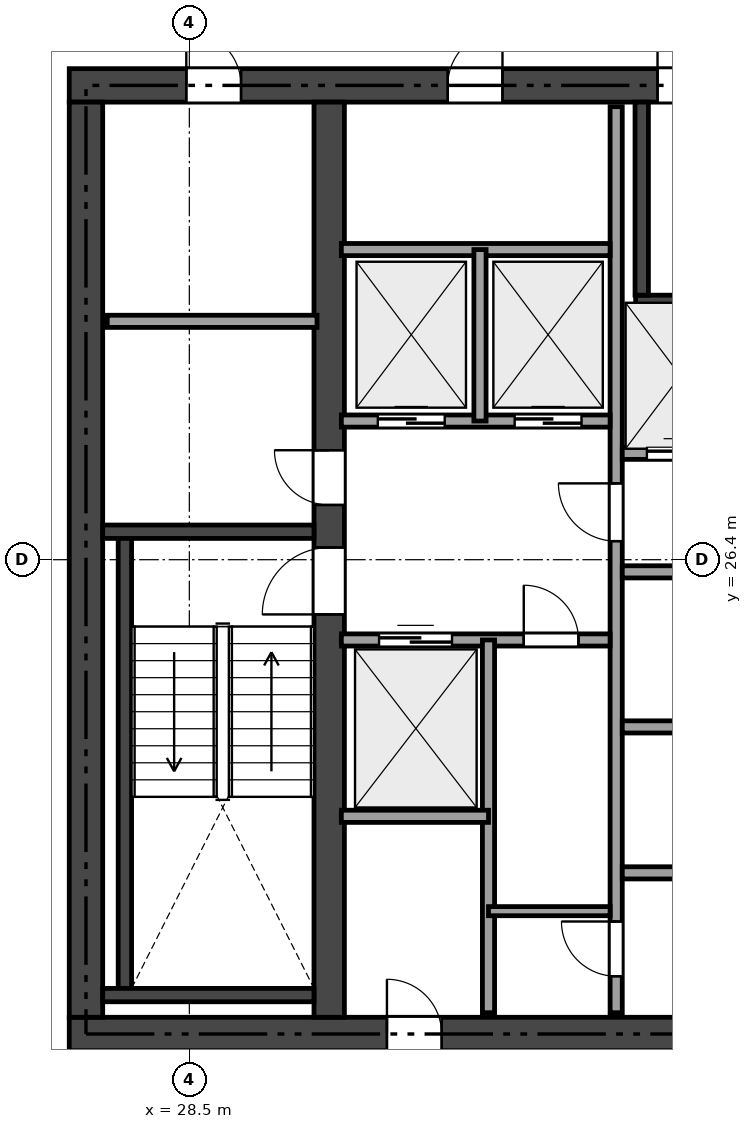
"""IFC4 building model, lengths in metres.
Left out: names, types, materials, properties, quantities, classifications, styles, units other than length and angle.
Written with IfcOpenShell. Run it as: python <this file> out.ifc"""

import sys

from ifc_helpers import new_model, si_unit, direction, frame, frame_2d, origin, place, context, subcontext, project, spatial, rectangle, extrude, element, fill, save


model = new_model("IFC4")
c1 = context("Model", 3, precision=1e-05, world=origin(), true_north=direction((0.0, 1.0)))
c2 = subcontext(c1, "Body", "Model", "MODEL_VIEW")
j1 = project(units=[si_unit("LENGTHUNIT", "METRE"), si_unit("PLANEANGLEUNIT", "RADIAN")], contexts=[c1])
p1 = place(None, origin())
s1 = spatial("IfcSite", under=j1, at=p1, CompositionType="ELEMENT")
p2 = place(p1, origin())
s2 = spatial("IfcBuilding", under=s1, at=p2, CompositionType="ELEMENT")
p3 = place(p2, frame((0.0, 0.0, 231.9)))
s3 = spatial("IfcBuildingStorey", under=s2, at=p3, CompositionType="ELEMENT", Elevation=231.9)
p4 = place(p3, frame((26.525, 18.6, 0.0), z_axis=(0.0, 0.0, 1.0), x_axis=(1.0, 0.0, 0.0)))
e1 = element("IfcWall", 1, at=p4, inside=s3, PredefinedType="SHEAR", context=c2, shape_type="SweptSolid", body=[
    extrude(rectangle(XDim=21.35, YDim=0.55, at=frame_2d((10.675, 0.0))), origin(), (0.0, 0.0, 1.0), 3.18),
])
p5 = place(p4, frame((12.4, 0.0, 0.0)))
e2 = element("IfcOpeningElement", 2, at=p5, cuts=e1, PredefinedType="OPENING", context=c2, shape_type="SweptSolid", body=[
    extrude(rectangle(XDim=1.15, YDim=2.15, at=frame_2d((0.575, 1.075))), frame((0.0, 0.285, 0.0), z_axis=(0.0, -1.0, 0.0), x_axis=(1.0, 0.0, 0.0)), (0.0, 0.0, 1.0), 0.57),
])
p6 = place(p4, frame((5.225, 0.0, 0.0)))
e3 = element("IfcOpeningElement", 3, at=p6, cuts=e1, PredefinedType="OPENING", context=c2, shape_type="SweptSolid", body=[
    extrude(rectangle(XDim=0.9, YDim=2.1, at=frame_2d((0.45, 1.05))), frame((0.0, 0.285, 0.0), z_axis=(0.0, -1.0, 0.0), x_axis=(1.0, 0.0, 0.0)), (0.0, 0.0, 1.0), 0.57),
])
p7 = place(p3, frame((26.525, 34.2, 0.0), z_axis=(0.0, 0.0, 1.0), x_axis=(1.0, 0.0, 0.0)))
e4 = element("IfcWall", 4, at=p7, inside=s3, PredefinedType="SHEAR", context=c2, shape_type="SweptSolid", body=[
    extrude(rectangle(XDim=21.35, YDim=0.55, at=frame_2d((10.675, 0.0))), origin(), (0.0, 0.0, 1.0), 3.18),
])
p8 = place(p7, frame((9.675, 0.0, 0.0)))
e5 = element("IfcOpeningElement", 5, at=p8, cuts=e4, PredefinedType="OPENING", context=c2, shape_type="SweptSolid", body=[
    extrude(rectangle(XDim=1.1, YDim=2.15, at=frame_2d((0.55, 1.075))), frame((0.0, 0.285, 0.0), z_axis=(0.0, -1.0, 0.0), x_axis=(1.0, 0.0, 0.0)), (0.0, 0.0, 1.0), 0.57),
])
p9 = place(p7, frame((1.925, 0.0, 0.0)))
e6 = element("IfcOpeningElement", 6, at=p9, cuts=e4, PredefinedType="OPENING", context=c2, shape_type="SweptSolid", body=[
    extrude(rectangle(XDim=0.9, YDim=2.1, at=frame_2d((0.45, 1.05))), frame((0.0, 0.285, 0.0), z_axis=(0.0, -1.0, 0.0), x_axis=(1.0, 0.0, 0.0)), (0.0, 0.0, 1.0), 0.57),
])
p10 = place(p7, frame((6.225, 0.0, 0.0)))
e7 = element("IfcOpeningElement", 7, at=p10, cuts=e4, PredefinedType="OPENING", context=c2, shape_type="SweptSolid", body=[
    extrude(rectangle(XDim=0.9, YDim=2.1, at=frame_2d((0.45, 1.05))), frame((0.0, 0.285, 0.0), z_axis=(0.0, -1.0, 0.0), x_axis=(1.0, 0.0, 0.0)), (0.0, 0.0, 1.0), 0.57),
])
p11 = place(p3, frame((26.8, 18.875, 0.0), z_axis=(0.0, 0.0, 1.0), x_axis=(0.0, 1.0, 0.0)))
e8 = element("IfcWall", 8, at=p11, inside=s3, PredefinedType="SHEAR", context=c2, shape_type="SweptSolid", body=[
    extrude(rectangle(XDim=15.05, YDim=0.55, at=frame_2d((7.525, 0.0))), origin(), (0.0, 0.0, 1.0), 3.18),
])
p12 = place(p3, frame((30.8, 18.875, 0.0), z_axis=(0.0, 0.0, 1.0), x_axis=(0.0, 1.0, 0.0)))
e9 = element("IfcWall", 9, at=p12, inside=s3, PredefinedType="SHEAR", context=c2, shape_type="SweptSolid", body=[
    extrude(rectangle(XDim=15.05, YDim=0.5, at=frame_2d((7.525, 0.0))), origin(), (0.0, 0.0, 1.0), 3.18),
])
p13 = place(p12, frame((6.625, 0.0, 0.0)))
e10 = element("IfcOpeningElement", 10, at=p13, cuts=e9, PredefinedType="OPENING", context=c2, shape_type="SweptSolid", body=[
    extrude(rectangle(XDim=1.1, YDim=2.15, at=frame_2d((0.55, 1.075))), frame((0.0, 0.26, 0.0), z_axis=(0.0, -1.0, 0.0), x_axis=(1.0, 0.0, 0.0)), (0.0, 0.0, 1.0), 0.52),
])
p14 = place(p12, frame((8.425, 0.0, 0.0)))
e11 = element("IfcOpeningElement", 11, at=p14, cuts=e9, PredefinedType="OPENING", context=c2, shape_type="SweptSolid", body=[
    extrude(rectangle(XDim=0.9, YDim=2.1, at=frame_2d((0.45, 1.05))), frame((0.0, 0.26, 0.0), z_axis=(0.0, -1.0, 0.0), x_axis=(1.0, 0.0, 0.0)), (0.0, 0.0, 1.0), 0.52),
])
p15 = place(p3, frame((27.075, 26.86, 0.0), z_axis=(0.0, 0.0, 1.0), x_axis=(1.0, 0.0, 0.0)))
e12 = element("IfcWall", 12, at=p15, inside=s3, PredefinedType="SHEAR", context=c2, shape_type="SweptSolid", body=[
    extrude(rectangle(XDim=3.475, YDim=0.22, at=frame_2d((1.738, 0.0))), origin(), (0.0, 0.0, 1.0), 3.18),
])
p16 = place(p3, frame((27.44, 19.35, 0.0), z_axis=(0.0, 0.0, 1.0), x_axis=(0.0, 1.0, 0.0)))
e13 = element("IfcWall", 13, at=p16, inside=s3, PredefinedType="SHEAR", context=c2, shape_type="SweptSolid", body=[
    extrude(rectangle(XDim=7.4, YDim=0.22, at=frame_2d((3.7, 0.0))), origin(), (0.0, 0.0, 1.0), 3.18),
])
p17 = place(p3, frame((27.075, 19.24, 0.0), z_axis=(0.0, 0.0, 1.0), x_axis=(1.0, 0.0, 0.0)))
e14 = element("IfcWall", 14, at=p17, inside=s3, PredefinedType="SHEAR", context=c2, shape_type="SweptSolid", body=[
    extrude(rectangle(XDim=3.475, YDim=0.22, at=frame_2d((1.738, 0.0))), origin(), (0.0, 0.0, 1.0), 3.18),
])
p18 = place(p3, frame((35.84, 30.64, 0.0), z_axis=(0.0, 0.0, 1.0), x_axis=(1.0, 0.0, 0.0)))
e15 = element("IfcWall", 15, at=p18, inside=s3, PredefinedType="SHEAR", context=c2, shape_type="SweptSolid", body=[
    extrude(rectangle(XDim=7.61, YDim=0.22, at=frame_2d((3.805, 0.0))), origin(), (0.0, 0.0, 1.0), 3.18),
])
p19 = place(p3, frame((35.94, 30.75, 0.0), z_axis=(0.0, 0.0, 1.0), x_axis=(0.0, 1.0, 0.0)))
e16 = element("IfcWall", 16, at=p19, inside=s3, PredefinedType="SHEAR", context=c2, shape_type="SweptSolid", body=[
    extrude(rectangle(XDim=3.175, YDim=0.22, at=frame_2d((1.587, 0.0))), origin(), (0.0, 0.0, 1.0), 3.18),
])
p20 = place(p3, frame((27.15, 30.32, 0.0), z_axis=(0.0, 0.0, 1.0), x_axis=(1.0, 0.0, 0.0)))
e17 = element("IfcWall", 17, at=p20, inside=s3, PredefinedType="SOLIDWALL", context=c2, shape_type="SweptSolid", body=[
    extrude(rectangle(XDim=3.45, YDim=0.2, at=frame_2d((1.725, 0.0))), origin(), (0.0, 0.0, 1.0), 3.18),
])
p21 = place(p3, frame((35.52, 18.95, 0.0), z_axis=(0.0, 0.0, 1.0), x_axis=(0.0, 1.0, 0.0)))
e18 = element("IfcWall", 18, at=p21, inside=s3, PredefinedType="SOLIDWALL", context=c2, shape_type="SweptSolid", body=[
    extrude(rectangle(XDim=14.9, YDim=0.2, at=frame_2d((7.45, 0.0))), origin(), (0.0, 0.0, 1.0), 2.701),
])
p22 = place(p21, frame((7.755, 0.0, 0.0)))
e19 = element("IfcOpeningElement", 19, at=p22, cuts=e18, PredefinedType="OPENING", context=c2, shape_type="SweptSolid", body=[
    extrude(rectangle(XDim=0.95, YDim=2.15, at=frame_2d((0.475, 1.075))), frame((0.0, 0.11, 0.0), z_axis=(0.0, -1.0, 0.0), x_axis=(1.0, 0.0, 0.0)), (0.0, 0.0, 1.0), 0.22),
])
p23 = place(p21, frame((0.6, 0.0, 0.0)))
e20 = element("IfcOpeningElement", 20, at=p23, cuts=e18, PredefinedType="OPENING", context=c2, shape_type="SweptSolid", body=[
    extrude(rectangle(XDim=0.9, YDim=2.1, at=frame_2d((0.45, 1.05))), frame((0.0, 0.11, 0.0), z_axis=(0.0, -1.0, 0.0), x_axis=(1.0, 0.0, 0.0)), (0.0, 0.0, 1.0), 0.22),
])
p24 = place(p3, frame((31.0, 28.68, 0.0), z_axis=(0.0, 0.0, 1.0), x_axis=(1.0, 0.0, 0.0)))
e21 = element("IfcWall", 21, at=p24, inside=s3, PredefinedType="SOLIDWALL", context=c2, shape_type="SweptSolid", body=[
    extrude(rectangle(XDim=4.42, YDim=0.2, at=frame_2d((2.21, 0.0))), origin(), (0.0, 0.0, 1.0), 3.18),
])
p25 = place(p24, frame((0.6, 0.0, 0.0)))
e22 = element("IfcOpeningElement", 22, at=p25, cuts=e21, PredefinedType="OPENING", context=c2, shape_type="SweptSolid", body=[
    extrude(rectangle(XDim=1.1, YDim=2.15, at=frame_2d((0.55, 1.075))), frame((0.0, 0.11, 0.0), z_axis=(0.0, -1.0, 0.0), x_axis=(1.0, 0.0, 0.0)), (0.0, 0.0, 1.0), 0.22),
])
p26 = place(p24, frame((2.85, 0.0, 0.0)))
e23 = element("IfcOpeningElement", 23, at=p26, cuts=e21, PredefinedType="OPENING", context=c2, shape_type="SweptSolid", body=[
    extrude(rectangle(XDim=1.1, YDim=2.15, at=frame_2d((0.55, 1.075))), frame((0.0, 0.11, 0.0), z_axis=(0.0, -1.0, 0.0), x_axis=(1.0, 0.0, 0.0)), (0.0, 0.0, 1.0), 0.22),
])
p27 = place(p3, frame((31.0, 31.5, 0.0), z_axis=(0.0, 0.0, 1.0), x_axis=(1.0, 0.0, 0.0)))
e24 = element("IfcWall", 24, at=p27, inside=s3, PredefinedType="SOLIDWALL", context=c2, shape_type="SweptSolid", body=[
    extrude(rectangle(XDim=4.42, YDim=0.2, at=frame_2d((2.21, 0.0))), origin(), (0.0, 0.0, 1.0), 3.18),
])
p28 = place(p3, frame((33.28, 28.68, 0.0), z_axis=(0.0, 0.0, 1.0), x_axis=(0.0, 1.0, 0.0)))
e25 = element("IfcWall", 25, at=p28, inside=s3, PredefinedType="SOLIDWALL", context=c2, shape_type="SweptSolid", body=[
    extrude(rectangle(XDim=2.82, YDim=0.2, at=frame_2d((1.41, 0.0))), origin(), (0.0, 0.0, 1.0), 3.18),
])
p29 = place(p3, frame((31.0, 25.08, 0.0), z_axis=(0.0, 0.0, 1.0), x_axis=(1.0, 0.0, 0.0)))
e26 = element("IfcWall", 26, at=p29, inside=s3, PredefinedType="SOLIDWALL", context=c2, shape_type="SweptSolid", body=[
    extrude(rectangle(XDim=4.42, YDim=0.2, at=frame_2d((2.21, 0.0))), origin(), (0.0, 0.0, 1.0), 3.18),
])
p30 = place(p29, frame((3.0, 0.0, 0.0)))
e27 = element("IfcOpeningElement", 27, at=p30, cuts=e26, PredefinedType="OPENING", context=c2, shape_type="SweptSolid", body=[
    extrude(rectangle(XDim=0.9, YDim=2.1, at=frame_2d((0.45, 1.05))), frame((0.0, 0.11, 0.0), z_axis=(0.0, -1.0, 0.0), x_axis=(1.0, 0.0, 0.0)), (0.0, 0.0, 1.0), 0.22),
])
p31 = place(p29, frame((0.62, 0.0, 0.0)))
e28 = element("IfcOpeningElement", 28, at=p31, cuts=e26, PredefinedType="OPENING", context=c2, shape_type="SweptSolid", body=[
    extrude(rectangle(XDim=1.2, YDim=2.15, at=frame_2d((0.6, 1.075))), frame((0.0, 0.11, 0.0), z_axis=(0.0, -1.0, 0.0), x_axis=(1.0, 0.0, 0.0)), (0.0, 0.0, 1.0), 0.22),
])
p32 = place(p3, frame((33.42, 18.95, 0.0), z_axis=(0.0, 0.0, 1.0), x_axis=(0.0, 1.0, 0.0)))
e29 = element("IfcWall", 29, at=p32, inside=s3, PredefinedType="SOLIDWALL", context=c2, shape_type="SweptSolid", body=[
    extrude(rectangle(XDim=6.13, YDim=0.2, at=frame_2d((3.065, 0.0))), origin(), (0.0, 0.0, 1.0), 2.701),
])
p33 = place(p3, frame((31.0, 22.18, 0.0), z_axis=(0.0, 0.0, 1.0), x_axis=(1.0, 0.0, 0.0)))
e30 = element("IfcWall", 30, at=p33, inside=s3, PredefinedType="SOLIDWALL", context=c2, shape_type="SweptSolid", body=[
    extrude(rectangle(XDim=2.42, YDim=0.2, at=frame_2d((1.21, 0.0))), origin(), (0.0, 0.0, 1.0), 3.18),
])
p34 = place(p3, frame((33.42, 20.62, 0.0), z_axis=(0.0, 0.0, 1.0), x_axis=(1.0, 0.0, 0.0)))
e31 = element("IfcWall", 31, at=p34, inside=s3, PredefinedType="PARTITIONING", context=c2, shape_type="SweptSolid", body=[
    extrude(rectangle(XDim=2.0, YDim=0.15, at=frame_2d((1.0, 0.0))), origin(), (0.0, 0.0, 1.0), 3.18),
])
p35 = place(p3, frame((35.62, 28.15, 0.0), z_axis=(0.0, 0.0, 1.0), x_axis=(1.0, 0.0, 0.0)))
e32 = element("IfcWall", 32, at=p35, inside=s3, PredefinedType="SOLIDWALL", context=c2, shape_type="SweptSolid", body=[
    extrude(rectangle(XDim=7.88, YDim=0.2, at=frame_2d((3.94, 0.0))), origin(), (0.0, 0.0, 1.0), 3.18),
])
p36 = place(p35, frame((0.405, 0.0, 0.0)))
e33 = element("IfcOpeningElement", 33, at=p36, cuts=e32, PredefinedType="OPENING", context=c2, shape_type="SweptSolid", body=[
    extrude(rectangle(XDim=1.1, YDim=2.15, at=frame_2d((0.55, 1.075))), frame((0.0, 0.11, 0.0), z_axis=(0.0, -1.0, 0.0), x_axis=(1.0, 0.0, 0.0)), (0.0, 0.0, 1.0), 0.22),
])
p37 = place(p35, frame((2.355, 0.0, 0.0)))
e34 = element("IfcOpeningElement", 34, at=p37, cuts=e32, PredefinedType="OPENING", context=c2, shape_type="SweptSolid", body=[
    extrude(rectangle(XDim=1.1, YDim=2.15, at=frame_2d((0.55, 1.075))), frame((0.0, 0.11, 0.0), z_axis=(0.0, -1.0, 0.0), x_axis=(1.0, 0.0, 0.0)), (0.0, 0.0, 1.0), 0.22),
])
p38 = place(p35, frame((4.305, 0.0, 0.0)))
e35 = element("IfcOpeningElement", 35, at=p38, cuts=e32, PredefinedType="OPENING", context=c2, shape_type="SweptSolid", body=[
    extrude(rectangle(XDim=1.1, YDim=2.15, at=frame_2d((0.55, 1.075))), frame((0.0, 0.11, 0.0), z_axis=(0.0, -1.0, 0.0), x_axis=(1.0, 0.0, 0.0)), (0.0, 0.0, 1.0), 0.22),
])
p39 = place(p35, frame((6.255, 0.0, 0.0)))
e36 = element("IfcOpeningElement", 36, at=p39, cuts=e32, PredefinedType="OPENING", context=c2, shape_type="SweptSolid", body=[
    extrude(rectangle(XDim=1.1, YDim=2.15, at=frame_2d((0.55, 1.075))), frame((0.0, 0.11, 0.0), z_axis=(0.0, -1.0, 0.0), x_axis=(1.0, 0.0, 0.0)), (0.0, 0.0, 1.0), 0.22),
])
p40 = place(p3, frame((35.62, 26.2, 0.0), z_axis=(0.0, 0.0, 1.0), x_axis=(1.0, 0.0, 0.0)))
e37 = element("IfcWall", 37, at=p40, inside=s3, PredefinedType="SOLIDWALL", context=c2, shape_type="SweptSolid", body=[
    extrude(rectangle(XDim=7.88, YDim=0.2, at=frame_2d((3.94, 0.0))), origin(), (0.0, 0.0, 1.0), 3.18),
])
p41 = place(p40, frame((1.13, 0.0, 0.0)))
e38 = element("IfcOpeningElement", 38, at=p41, cuts=e37, PredefinedType="OPENING", context=c2, shape_type="SweptSolid", body=[
    extrude(rectangle(XDim=0.9, YDim=2.1, at=frame_2d((0.45, 1.05))), frame((0.0, 0.11, 0.0), z_axis=(0.0, -1.0, 0.0), x_axis=(1.0, 0.0, 0.0)), (0.0, 0.0, 1.0), 0.22),
])
p42 = place(p40, frame((5.73, 0.0, 0.0)))
e39 = element("IfcOpeningElement", 39, at=p42, cuts=e37, PredefinedType="OPENING", context=c2, shape_type="SweptSolid", body=[
    extrude(rectangle(XDim=0.9, YDim=2.1, at=frame_2d((0.45, 1.05))), frame((0.0, 0.11, 0.0), z_axis=(0.0, -1.0, 0.0), x_axis=(1.0, 0.0, 0.0)), (0.0, 0.0, 1.0), 0.22),
])
p43 = place(p3, frame((35.62, 23.65, 0.0), z_axis=(0.0, 0.0, 1.0), x_axis=(1.0, 0.0, 0.0)))
e40 = element("IfcWall", 40, at=p43, inside=s3, PredefinedType="SOLIDWALL", context=c2, shape_type="SweptSolid", body=[
    extrude(rectangle(XDim=7.88, YDim=0.2, at=frame_2d((3.94, 0.0))), origin(), (0.0, 0.0, 1.0), 2.701),
])
p44 = place(p3, frame((35.62, 21.25, 0.0), z_axis=(0.0, 0.0, 1.0), x_axis=(1.0, 0.0, 0.0)))
e41 = element("IfcWall", 41, at=p44, inside=s3, PredefinedType="SOLIDWALL", context=c2, shape_type="SweptSolid", body=[
    extrude(rectangle(XDim=7.88, YDim=0.2, at=frame_2d((3.94, 0.0))), origin(), (0.0, 0.0, 1.0), 3.18),
])
p45 = place(p44, frame((1.13, 0.0, 0.0)))
e42 = element("IfcOpeningElement", 42, at=p45, cuts=e41, PredefinedType="OPENING", context=c2, shape_type="SweptSolid", body=[
    extrude(rectangle(XDim=0.9, YDim=2.1, at=frame_2d((0.45, 1.05))), frame((0.0, 0.11, 0.0), z_axis=(0.0, -1.0, 0.0), x_axis=(1.0, 0.0, 0.0)), (0.0, 0.0, 1.0), 0.22),
])
p46 = place(p44, frame((5.73, 0.0, 0.0)))
e43 = element("IfcOpeningElement", 43, at=p46, cuts=e41, PredefinedType="OPENING", context=c2, shape_type="SweptSolid", body=[
    extrude(rectangle(XDim=0.9, YDim=2.1, at=frame_2d((0.45, 1.05))), frame((0.0, 0.11, 0.0), z_axis=(0.0, -1.0, 0.0), x_axis=(1.0, 0.0, 0.0)), (0.0, 0.0, 1.0), 0.22),
])
p47 = place(p13, origin())
e44 = element("IfcDoor", 44, at=p47, inside=s3, OperationType="SINGLE_SWING_LEFT", PredefinedType="DOOR", context=c2, shape_type="SweptSolid", body=[
    extrude(rectangle(XDim=1.1, YDim=2.15, at=frame_2d((0.55, 1.075))), frame((0.0, 0.025, 0.0), z_axis=(0.0, -1.0, 0.0), x_axis=(1.0, 0.0, 0.0)), (0.0, 0.0, 1.0), 0.05),
])
fill(e10, e44)
p48 = place(p8, origin())
e45 = element("IfcDoor", 45, at=p48, inside=s3, OperationType="SINGLE_SWING_LEFT", PredefinedType="DOOR", context=c2, shape_type="SweptSolid", body=[
    extrude(rectangle(XDim=1.1, YDim=2.15, at=frame_2d((0.55, 1.075))), frame((0.0, 0.025, 0.0), z_axis=(0.0, -1.0, 0.0), x_axis=(1.0, 0.0, 0.0)), (0.0, 0.0, 1.0), 0.05),
])
fill(e5, e45)
p49 = place(p22, origin())
e46 = element("IfcDoor", 46, at=p49, inside=s3, OperationType="SINGLE_SWING_RIGHT", PredefinedType="DOOR", context=c2, shape_type="SweptSolid", body=[
    extrude(rectangle(XDim=0.95, YDim=2.15, at=frame_2d((0.475, 1.075))), frame((0.0, 0.025, 0.0), z_axis=(0.0, -1.0, 0.0), x_axis=(1.0, 0.0, 0.0)), (0.0, 0.0, 1.0), 0.05),
])
fill(e19, e46)
p50 = place(p14, origin())
e47 = element("IfcDoor", 47, at=p50, inside=s3, OperationType="SINGLE_SWING_RIGHT", PredefinedType="DOOR", context=c2, shape_type="SweptSolid", body=[
    extrude(rectangle(XDim=0.9, YDim=2.1, at=frame_2d((0.45, 1.05))), frame((0.0, 0.025, 0.0), z_axis=(0.0, -1.0, 0.0), x_axis=(1.0, 0.0, 0.0)), (0.0, 0.0, 1.0), 0.05),
])
fill(e11, e47)
p51 = place(p9, origin())
e48 = element("IfcDoor", 48, at=p51, inside=s3, OperationType="SINGLE_SWING_LEFT", PredefinedType="DOOR", context=c2, shape_type="SweptSolid", body=[
    extrude(rectangle(XDim=0.9, YDim=2.1, at=frame_2d((0.45, 1.05))), frame((0.0, 0.025, 0.0), z_axis=(0.0, -1.0, 0.0), x_axis=(1.0, 0.0, 0.0)), (0.0, 0.0, 1.0), 0.05),
])
fill(e6, e48)
p52 = place(p10, origin())
e49 = element("IfcDoor", 49, at=p52, inside=s3, OperationType="SINGLE_SWING_RIGHT", PredefinedType="DOOR", context=c2, shape_type="SweptSolid", body=[
    extrude(rectangle(XDim=0.9, YDim=2.1, at=frame_2d((0.45, 1.05))), frame((0.0, 0.025, 0.0), z_axis=(0.0, -1.0, 0.0), x_axis=(1.0, 0.0, 0.0)), (0.0, 0.0, 1.0), 0.05),
])
fill(e7, e49)
p53 = place(p6, origin())
e50 = element("IfcDoor", 50, at=p53, inside=s3, OperationType="SINGLE_SWING_LEFT", PredefinedType="DOOR", context=c2, shape_type="SweptSolid", body=[
    extrude(rectangle(XDim=0.9, YDim=2.1, at=frame_2d((0.45, 1.05))), frame((0.0, 0.025, 0.0), z_axis=(0.0, -1.0, 0.0), x_axis=(1.0, 0.0, 0.0)), (0.0, 0.0, 1.0), 0.05),
])
fill(e3, e50)
p54 = place(p23, origin())
e51 = element("IfcDoor", 51, at=p54, inside=s3, OperationType="SINGLE_SWING_RIGHT", PredefinedType="DOOR", context=c2, shape_type="SweptSolid", body=[
    extrude(rectangle(XDim=0.9, YDim=2.1, at=frame_2d((0.45, 1.05))), frame((0.0, 0.025, 0.0), z_axis=(0.0, -1.0, 0.0), x_axis=(1.0, 0.0, 0.0)), (0.0, 0.0, 1.0), 0.05),
])
fill(e20, e51)
p55 = place(p30, origin())
e52 = element("IfcDoor", 52, at=p55, inside=s3, OperationType="SINGLE_SWING_LEFT", PredefinedType="DOOR", context=c2, shape_type="SweptSolid", body=[
    extrude(rectangle(XDim=0.9, YDim=2.1, at=frame_2d((0.45, 1.05))), frame((0.0, 0.025, 0.0), z_axis=(0.0, -1.0, 0.0), x_axis=(1.0, 0.0, 0.0)), (0.0, 0.0, 1.0), 0.05),
])
fill(e27, e52)
p56 = place(p25, origin())
e53 = element("IfcDoor", 53, at=p56, inside=s3, OperationType="SLIDING_TO_LEFT", PredefinedType="DOOR", context=c2, shape_type="SweptSolid", body=[
    extrude(rectangle(XDim=1.1, YDim=2.15, at=frame_2d((0.55, 1.075))), frame((0.0, 0.025, 0.0), z_axis=(0.0, -1.0, 0.0), x_axis=(1.0, 0.0, 0.0)), (0.0, 0.0, 1.0), 0.05),
])
fill(e22, e53)
p57 = place(p26, origin())
e54 = element("IfcDoor", 54, at=p57, inside=s3, OperationType="SLIDING_TO_LEFT", PredefinedType="DOOR", context=c2, shape_type="SweptSolid", body=[
    extrude(rectangle(XDim=1.1, YDim=2.15, at=frame_2d((0.55, 1.075))), frame((0.0, 0.025, 0.0), z_axis=(0.0, -1.0, 0.0), x_axis=(1.0, 0.0, 0.0)), (0.0, 0.0, 1.0), 0.05),
])
fill(e23, e54)
p58 = place(p31, origin())
e55 = element("IfcDoor", 55, at=p58, inside=s3, OperationType="SLIDING_TO_LEFT", PredefinedType="DOOR", context=c2, shape_type="SweptSolid", body=[
    extrude(rectangle(XDim=1.2, YDim=2.15, at=frame_2d((0.6, 1.075))), frame((0.0, 0.025, 0.0), z_axis=(0.0, -1.0, 0.0), x_axis=(1.0, 0.0, 0.0)), (0.0, 0.0, 1.0), 0.05),
])
fill(e28, e55)
p59 = place(p36, origin())
e56 = element("IfcDoor", 56, at=p59, inside=s3, OperationType="SLIDING_TO_LEFT", PredefinedType="DOOR", context=c2, shape_type="SweptSolid", body=[
    extrude(rectangle(XDim=1.1, YDim=2.15, at=frame_2d((0.55, 1.075))), frame((0.0, 0.025, 0.0), z_axis=(0.0, -1.0, 0.0), x_axis=(1.0, 0.0, 0.0)), (0.0, 0.0, 1.0), 0.05),
])
fill(e33, e56)
save(model, sys.argv[1])
